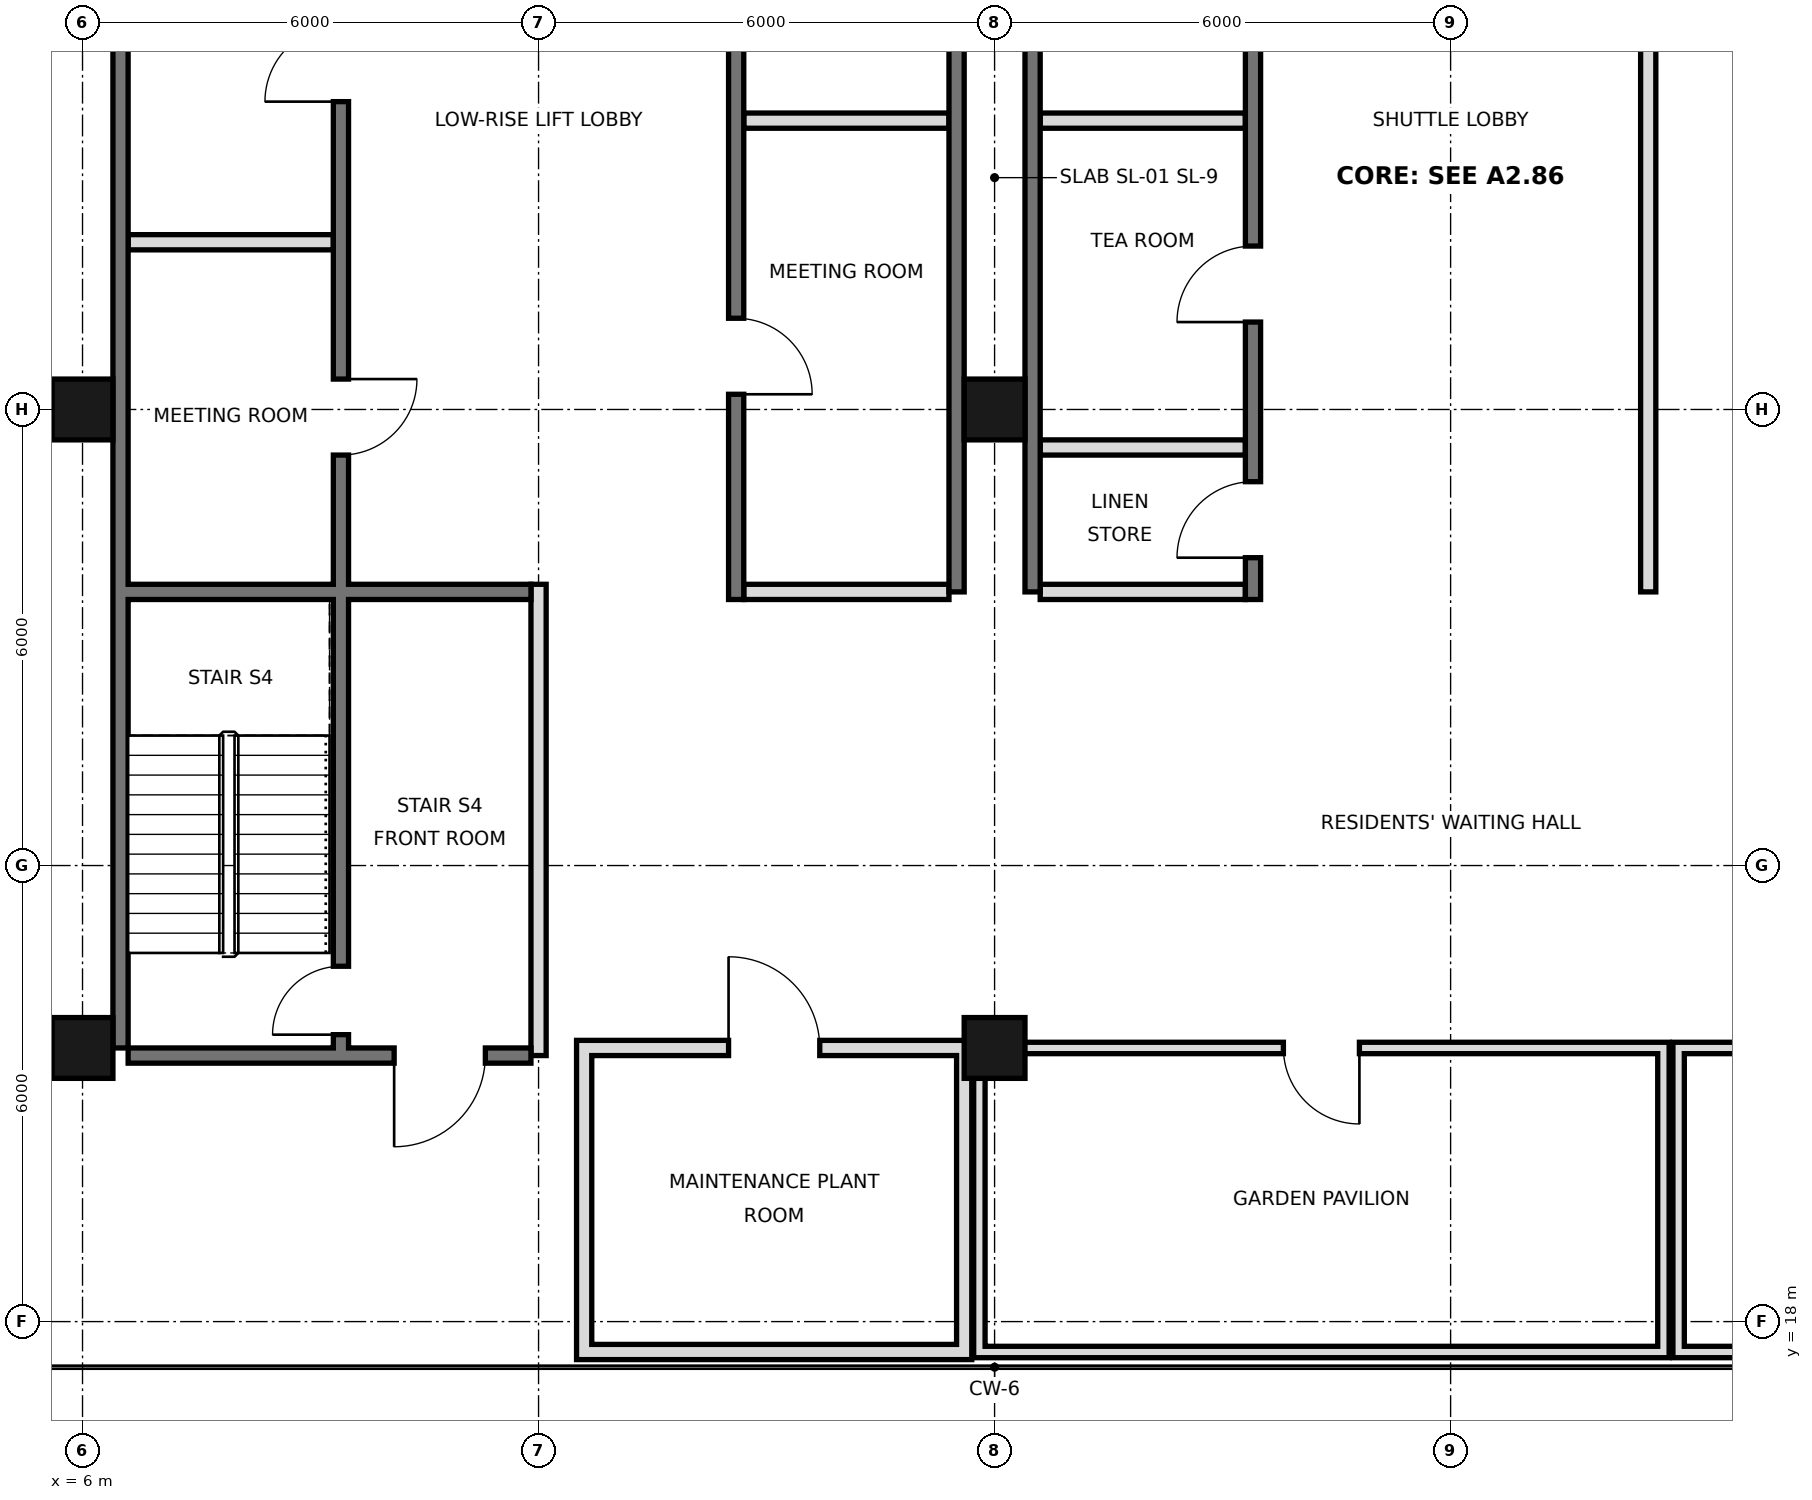
"""IFC4 building model, lengths in metres.
Left out: names, types, materials, properties, quantities, classifications, styles, units other than length and angle.
Written with IfcOpenShell. Run it as: python <this file> out.ifc"""

import sys

from ifc_helpers import new_model, si_unit, direction, frame, frame_2d, origin, origin_2d, place, context, subcontext, project, spatial, rectangle, hollow_rectangle, extrude, element, fill, save


model = new_model("IFC4")
c1 = context("Model", 3, precision=1e-05, world=origin(), true_north=direction((0.0, 1.0)))
c2 = subcontext(c1, "Body", "Model", "MODEL_VIEW")
j1 = project(units=[si_unit("LENGTHUNIT", "METRE"), si_unit("PLANEANGLEUNIT", "RADIAN")], contexts=[c1])
p1 = place(None, origin())
s1 = spatial("IfcSite", under=j1, at=p1, CompositionType="ELEMENT")
p2 = place(p1, origin())
s2 = spatial("IfcBuilding", under=s1, at=p2, CompositionType="ELEMENT")
p3 = place(p2, frame((0.0, 0.0, 345.8)))
s3 = spatial("IfcBuildingStorey", under=s2, at=p3, CompositionType="ELEMENT", Elevation=345.8)
for number, where, z_axis, x_axis in (
    (1, (6.0, 21.6, 0.0), (0.0, 0.0, 1.0), (1.0, 0.0, 0.0)),
    (2, (6.0, 30.0, 0.0), (0.0, 0.0, 1.0), (1.0, 0.0, 0.0)),
    (3, (18.0, 21.6, 0.0), (0.0, 0.0, 1.0), (1.0, 0.0, 0.0)),
    (4, (18.0, 30.0, 0.0), (0.0, 0.0, 1.0), (1.0, 0.0, 0.0)),
):
    element("IfcColumn", number, at=place(p3, frame(where, z_axis=z_axis, x_axis=x_axis)), inside=s3, PredefinedType="COLUMN", context=c2, shape_type="SweptSolid", body=[
        extrude(hollow_rectangle(XDim=0.8, YDim=0.8, WallThickness=0.025, at=origin_2d()), origin(), (0.0, 0.0, 1.0), 4.0),
    ])
for number, where, z_axis, x_axis in (
    (5, (12.6, 17.5, 0.0), (0.0, 0.0, 1.0), (0.0, 1.0, 0.0)),
    (6, (17.6, 17.5, 0.0), (0.0, 0.0, 1.0), (0.0, 1.0, 0.0)),
):
    element("IfcWall", number, at=place(p3, frame(where, z_axis=z_axis, x_axis=x_axis)), inside=s3, PredefinedType="SOLIDWALL", context=c2, shape_type="SweptSolid", body=[
        extrude(rectangle(XDim=4.2, YDim=0.2, at=frame_2d((2.1, 0.0))), origin(), (0.0, 0.0, 1.0), 3.05),
    ])
p4 = place(p3, frame((17.8, 17.525, 0.0), z_axis=(0.0, 0.0, 1.0), x_axis=(0.0, 1.0, 0.0)))
e7 = element("IfcWall", 7, at=p4, inside=s3, PredefinedType="PARTITIONING", context=c2, shape_type="SweptSolid", body=[
    extrude(rectangle(XDim=4.15, YDim=0.15, at=frame_2d((2.075, 0.0))), origin(), (0.0, 0.0, 1.0), 3.15),
])
for number, where, z_axis, x_axis in (
    (8, (26.8, 17.525, 0.0), (0.0, 0.0, 1.0), (0.0, 1.0, 0.0)),
    (9, (27.0, 17.525, 0.0), (0.0, 0.0, 1.0), (0.0, 1.0, 0.0)),
):
    element("IfcWall", number, at=place(p3, frame(where, z_axis=z_axis, x_axis=x_axis)), inside=s3, PredefinedType="PARTITIONING", context=c2, shape_type="SweptSolid", body=[
        extrude(rectangle(XDim=4.15, YDim=0.15, at=frame_2d((2.075, 0.0))), origin(), (0.0, 0.0, 1.0), 3.75),
    ])
p5 = place(p3, frame((12.7, 17.6, 0.0), z_axis=(0.0, 0.0, 1.0), x_axis=(1.0, 0.0, 0.0)))
e10 = element("IfcWall", 10, at=p5, inside=s3, PredefinedType="SOLIDWALL", context=c2, shape_type="SweptSolid", body=[
    extrude(rectangle(XDim=4.8, YDim=0.2, at=frame_2d((2.4, 0.0))), origin(), (0.0, 0.0, 1.0), 3.75),
])
p6 = place(p3, frame((17.875, 17.6, 0.0), z_axis=(0.0, 0.0, 1.0), x_axis=(1.0, 0.0, 0.0)))
e11 = element("IfcWall", 11, at=p6, inside=s3, PredefinedType="PARTITIONING", context=c2, shape_type="SweptSolid", body=[
    extrude(rectangle(XDim=8.85, YDim=0.15, at=frame_2d((4.425, 0.0))), origin(), (0.0, 0.0, 1.0), 3.75),
])
p7 = place(p3, frame((27.075, 17.6, 0.0), z_axis=(0.0, 0.0, 1.0), x_axis=(1.0, 0.0, 0.0)))
e12 = element("IfcWall", 12, at=p7, inside=s3, PredefinedType="PARTITIONING", context=c2, shape_type="SweptSolid", body=[
    extrude(rectangle(XDim=3.85, YDim=0.15, at=frame_2d((1.925, 0.0))), origin(), (0.0, 0.0, 1.0), 3.75),
])
p8 = place(p3, frame((12.7, 21.6, 0.0), z_axis=(0.0, 0.0, 1.0), x_axis=(1.0, 0.0, 0.0)))
e13 = element("IfcWall", 13, at=p8, inside=s3, PredefinedType="SOLIDWALL", context=c2, shape_type="SweptSolid", body=[
    extrude(rectangle(XDim=4.8, YDim=0.2, at=frame_2d((2.4, 0.0))), origin(), (0.0, 0.0, 1.0), 3.75),
])
p9 = place(p8, frame((1.8, 0.0, 0.0)))
e14 = element("IfcOpeningElement", 14, at=p9, cuts=e13, PredefinedType="OPENING", context=c2, shape_type="SweptSolid", body=[
    extrude(rectangle(XDim=1.2, YDim=2.4, at=frame_2d((0.6, 1.2))), frame((0.0, 0.11, 0.0), z_axis=(0.0, -1.0, 0.0), x_axis=(1.0, 0.0, 0.0)), (0.0, 0.0, 1.0), 0.22),
])
p10 = place(p3, frame((17.875, 21.6, 0.0), z_axis=(0.0, 0.0, 1.0), x_axis=(1.0, 0.0, 0.0)))
e15 = element("IfcWall", 15, at=p10, inside=s3, PredefinedType="PARTITIONING", context=c2, shape_type="SweptSolid", body=[
    extrude(rectangle(XDim=8.85, YDim=0.15, at=frame_2d((4.425, 0.0))), origin(), (0.0, 0.0, 1.0), 3.75),
])
p11 = place(p10, frame((3.925, 0.0, 0.0)))
e16 = element("IfcOpeningElement", 16, at=p11, cuts=e15, PredefinedType="OPENING", context=c2, shape_type="SweptSolid", body=[
    extrude(rectangle(XDim=1.0, YDim=2.4, at=frame_2d((0.5, 1.2))), frame((0.0, 0.085, 0.0), z_axis=(0.0, -1.0, 0.0), x_axis=(1.0, 0.0, 0.0)), (0.0, 0.0, 1.0), 0.17),
])
p12 = place(p3, frame((27.075, 21.6, 0.0), z_axis=(0.0, 0.0, 1.0), x_axis=(1.0, 0.0, 0.0)))
e17 = element("IfcWall", 17, at=p12, inside=s3, PredefinedType="PARTITIONING", context=c2, shape_type="SweptSolid", body=[
    extrude(rectangle(XDim=3.85, YDim=0.15, at=frame_2d((1.925, 0.0))), origin(), (0.0, 0.0, 1.0), 3.75),
])
p13 = place(p12, frame((1.425, 0.0, 0.0)))
e18 = element("IfcOpeningElement", 18, at=p13, cuts=e17, PredefinedType="OPENING", context=c2, shape_type="SweptSolid", body=[
    extrude(rectangle(XDim=1.0, YDim=2.4, at=frame_2d((0.5, 1.2))), frame((0.0, 0.085, 0.0), z_axis=(0.0, -1.0, 0.0), x_axis=(1.0, 0.0, 0.0)), (0.0, 0.0, 1.0), 0.17),
])
p14 = place(p3, frame((6.5, 21.6, 0.0), z_axis=(0.0, 0.0, 1.0), x_axis=(0.0, 1.0, 0.0)))
e19 = element("IfcWall", 19, at=p14, inside=s3, PredefinedType="SOLIDWALL", context=c2, shape_type="SweptSolid", body=[
    extrude(rectangle(XDim=23.5, YDim=0.2, at=frame_2d((11.75, 0.0))), origin(), (0.0, 0.0, 1.0), 3.75),
])
for number, where, z_axis, x_axis in (
    (20, (17.5, 27.6, 0.0), (0.0, 0.0, 1.0), (0.0, 1.0, 0.0)),
    (21, (18.5, 27.6, 0.0), (0.0, 0.0, 1.0), (0.0, 1.0, 0.0)),
):
    element("IfcWall", number, at=place(p3, frame(where, z_axis=z_axis, x_axis=x_axis)), inside=s3, PredefinedType="SOLIDWALL", context=c2, shape_type="SweptSolid", body=[
        extrude(rectangle(XDim=17.5, YDim=0.2, at=frame_2d((8.75, 0.0))), origin(), (0.0, 0.0, 1.0), 3.75),
    ])
p15 = place(p3, frame((12.0, 21.5, 0.0), z_axis=(0.0, 0.0, 1.0), x_axis=(0.0, 1.0, 0.0)))
e22 = element("IfcWall", 22, at=p15, inside=s3, PredefinedType="PARTITIONING", context=c2, shape_type="SweptSolid", body=[
    extrude(rectangle(XDim=6.2, YDim=0.2, at=frame_2d((3.1, 0.0))), origin(), (0.0, 0.0, 1.0), 3.75),
])
p16 = place(p3, frame((14.6, 27.5, 0.0), z_axis=(0.0, 0.0, 1.0), x_axis=(0.0, 1.0, 0.0)))
e23 = element("IfcWall", 23, at=p16, inside=s3, PredefinedType="SOLIDWALL", context=c2, shape_type="SweptSolid", body=[
    extrude(rectangle(XDim=17.5, YDim=0.2, at=frame_2d((8.75, 0.0))), origin(), (0.0, 0.0, 1.0), 3.75),
])
p17 = place(p16, frame((15.4, 0.0, 0.0)))
e24 = element("IfcOpeningElement", 24, at=p17, cuts=e23, PredefinedType="OPENING", context=c2, shape_type="SweptSolid", body=[
    extrude(rectangle(XDim=1.1, YDim=2.1, at=frame_2d((0.55, 1.05))), frame((0.0, 0.11, 0.0), z_axis=(0.0, -1.0, 0.0), x_axis=(1.0, 0.0, 0.0)), (0.0, 0.0, 1.0), 0.22),
])
p18 = place(p16, frame((2.7, 0.0, 0.0)))
e25 = element("IfcOpeningElement", 25, at=p18, cuts=e23, PredefinedType="OPENING", context=c2, shape_type="SweptSolid", body=[
    extrude(rectangle(XDim=1.0, YDim=2.1, at=frame_2d((0.5, 1.05))), frame((0.0, 0.11, 0.0), z_axis=(0.0, -1.0, 0.0), x_axis=(1.0, 0.0, 0.0)), (0.0, 0.0, 1.0), 0.22),
])
p19 = place(p3, frame((21.4, 27.5, 0.0), z_axis=(0.0, 0.0, 1.0), x_axis=(0.0, 1.0, 0.0)))
e26 = element("IfcWall", 26, at=p19, inside=s3, PredefinedType="SOLIDWALL", context=c2, shape_type="SweptSolid", body=[
    extrude(rectangle(XDim=17.5, YDim=0.2, at=frame_2d((8.75, 0.0))), origin(), (0.0, 0.0, 1.0), 3.75),
])
p20 = place(p19, frame((0.55, 0.0, 0.0)))
e27 = element("IfcOpeningElement", 27, at=p20, cuts=e26, PredefinedType="OPENING", context=c2, shape_type="SweptSolid", body=[
    extrude(rectangle(XDim=1.0, YDim=2.1, at=frame_2d((0.5, 1.05))), frame((0.0, 0.11, 0.0), z_axis=(0.0, -1.0, 0.0), x_axis=(1.0, 0.0, 0.0)), (0.0, 0.0, 1.0), 0.22),
])
p21 = place(p19, frame((3.65, 0.0, 0.0)))
e28 = element("IfcOpeningElement", 28, at=p21, cuts=e26, PredefinedType="OPENING", context=c2, shape_type="SweptSolid", body=[
    extrude(rectangle(XDim=1.0, YDim=2.1, at=frame_2d((0.5, 1.05))), frame((0.0, 0.11, 0.0), z_axis=(0.0, -1.0, 0.0), x_axis=(1.0, 0.0, 0.0)), (0.0, 0.0, 1.0), 0.22),
])
p22 = place(p19, frame((9.8, 0.0, 0.0)))
e29 = element("IfcOpeningElement", 29, at=p22, cuts=e26, PredefinedType="OPENING", context=c2, shape_type="SweptSolid", body=[
    extrude(rectangle(XDim=1.0, YDim=2.1, at=frame_2d((0.5, 1.05))), frame((0.0, 0.11, 0.0), z_axis=(0.0, -1.0, 0.0), x_axis=(1.0, 0.0, 0.0)), (0.0, 0.0, 1.0), 0.22),
])
p23 = place(p3, frame((26.6, 27.6, 0.0), z_axis=(0.0, 0.0, 1.0), x_axis=(0.0, 1.0, 0.0)))
e30 = element("IfcWall", 30, at=p23, inside=s3, PredefinedType="PARTITIONING", context=c2, shape_type="SweptSolid", body=[
    extrude(rectangle(XDim=17.4, YDim=0.2, at=frame_2d((8.7, 0.0))), origin(), (0.0, 0.0, 1.0), 3.75),
])
p24 = place(p23, frame((10.25, 0.0, 0.0)))
e31 = element("IfcOpeningElement", 31, at=p24, cuts=e30, PredefinedType="OPENING", context=c2, shape_type="SweptSolid", body=[
    extrude(rectangle(XDim=1.0, YDim=2.1, at=frame_2d((0.5, 1.05))), frame((0.0, 0.11, 0.0), z_axis=(0.0, -1.0, 0.0), x_axis=(1.0, 0.0, 0.0)), (0.0, 0.0, 1.0), 0.22),
])
p25 = place(p23, frame((15.375, 0.0, 0.0)))
e32 = element("IfcOpeningElement", 32, at=p25, cuts=e30, PredefinedType="OPENING", context=c2, shape_type="SweptSolid", body=[
    extrude(rectangle(XDim=1.0, YDim=2.1, at=frame_2d((0.5, 1.05))), frame((0.0, 0.11, 0.0), z_axis=(0.0, -1.0, 0.0), x_axis=(1.0, 0.0, 0.0)), (0.0, 0.0, 1.0), 0.22),
])
p26 = place(p3, frame((9.4, 21.5, 0.0), z_axis=(0.0, 0.0, 1.0), x_axis=(0.0, 1.0, 0.0)))
e33 = element("IfcWall", 33, at=p26, inside=s3, PredefinedType="SOLIDWALL", context=c2, shape_type="SweptSolid", body=[
    extrude(rectangle(XDim=23.5, YDim=0.2, at=frame_2d((11.75, 0.0))), origin(), (0.0, 0.0, 1.0), 3.75),
])
p27 = place(p26, frame((7.9, 0.0, 0.0)))
e34 = element("IfcOpeningElement", 34, at=p27, cuts=e33, PredefinedType="OPENING", context=c2, shape_type="SweptSolid", body=[
    extrude(rectangle(XDim=1.0, YDim=2.1, at=frame_2d((0.5, 1.05))), frame((0.0, 0.11, 0.0), z_axis=(0.0, -1.0, 0.0), x_axis=(1.0, 0.0, 0.0)), (0.0, 0.0, 1.0), 0.22),
])
p28 = place(p26, frame((12.55, 0.0, 0.0)))
e35 = element("IfcOpeningElement", 35, at=p28, cuts=e33, PredefinedType="OPENING", context=c2, shape_type="SweptSolid", body=[
    extrude(rectangle(XDim=1.0, YDim=2.1, at=frame_2d((0.5, 1.05))), frame((0.0, 0.11, 0.0), z_axis=(0.0, -1.0, 0.0), x_axis=(1.0, 0.0, 0.0)), (0.0, 0.0, 1.0), 0.22),
])
p29 = place(p26, frame((15.8, 0.0, 0.0)))
e36 = element("IfcOpeningElement", 36, at=p29, cuts=e33, PredefinedType="OPENING", context=c2, shape_type="SweptSolid", body=[
    extrude(rectangle(XDim=1.0, YDim=2.1, at=frame_2d((0.5, 1.05))), frame((0.0, 0.11, 0.0), z_axis=(0.0, -1.0, 0.0), x_axis=(1.0, 0.0, 0.0)), (0.0, 0.0, 1.0), 0.22),
])
p30 = place(p26, frame((0.275, 0.0, 0.0)))
e37 = element("IfcOpeningElement", 37, at=p30, cuts=e33, PredefinedType="OPENING", context=c2, shape_type="SweptSolid", body=[
    extrude(rectangle(XDim=0.9, YDim=2.1, at=frame_2d((0.45, 1.05))), frame((0.0, 0.11, 0.0), z_axis=(0.0, -1.0, 0.0), x_axis=(1.0, 0.0, 0.0)), (0.0, 0.0, 1.0), 0.22),
])
p31 = place(p3, frame((6.6, 21.5, 0.0), z_axis=(0.0, 0.0, 1.0), x_axis=(1.0, 0.0, 0.0)))
e38 = element("IfcWall", 38, at=p31, inside=s3, PredefinedType="SOLIDWALL", context=c2, shape_type="SweptSolid", body=[
    extrude(rectangle(XDim=5.3, YDim=0.2, at=frame_2d((2.65, 0.0))), origin(), (0.0, 0.0, 1.0), 3.75),
])
p32 = place(p31, frame((3.5, 0.0, 0.0)))
e39 = element("IfcOpeningElement", 39, at=p32, cuts=e38, PredefinedType="OPENING", context=c2, shape_type="SweptSolid", body=[
    extrude(rectangle(XDim=1.2, YDim=2.1, at=frame_2d((0.6, 1.05))), frame((0.0, 0.11, 0.0), z_axis=(0.0, -1.0, 0.0), x_axis=(1.0, 0.0, 0.0)), (0.0, 0.0, 1.0), 0.22),
])
for number, where, z_axis, x_axis in (
    (40, (14.7, 27.6, 0.0), (0.0, 0.0, 1.0), (1.0, 0.0, 0.0)),
    (41, (18.6, 27.6, 0.0), (0.0, 0.0, 1.0), (1.0, 0.0, 0.0)),
):
    element("IfcWall", number, at=place(p3, frame(where, z_axis=z_axis, x_axis=x_axis)), inside=s3, PredefinedType="PARTITIONING", context=c2, shape_type="SweptSolid", body=[
        extrude(rectangle(XDim=2.7, YDim=0.2, at=frame_2d((1.35, 0.0))), origin(), (0.0, 0.0, 1.0), 3.75),
    ])
p33 = place(p3, frame((6.6, 27.6, 0.0), z_axis=(0.0, 0.0, 1.0), x_axis=(1.0, 0.0, 0.0)))
e42 = element("IfcWall", 42, at=p33, inside=s3, PredefinedType="SOLIDWALL", context=c2, shape_type="SweptSolid", body=[
    extrude(rectangle(XDim=5.3, YDim=0.2, at=frame_2d((2.65, 0.0))), origin(), (0.0, 0.0, 1.0), 3.75),
])
for number, where, z_axis, x_axis in (
    (43, (18.6, 29.5, 0.0), (0.0, 0.0, 1.0), (1.0, 0.0, 0.0)),
    (44, (6.6, 32.2, 0.0), (0.0, 0.0, 1.0), (1.0, 0.0, 0.0)),
    (45, (14.7, 33.8, 0.0), (0.0, 0.0, 1.0), (1.0, 0.0, 0.0)),
    (46, (18.6, 33.8, 0.0), (0.0, 0.0, 1.0), (1.0, 0.0, 0.0)),
):
    element("IfcWall", number, at=place(p3, frame(where, z_axis=z_axis, x_axis=x_axis)), inside=s3, PredefinedType="PARTITIONING", context=c2, shape_type="SweptSolid", body=[
        extrude(rectangle(XDim=2.7, YDim=0.2, at=frame_2d((1.35, 0.0))), origin(), (0.0, 0.0, 1.0), 3.75),
    ])
p34 = place(p9, origin())
e47 = element("IfcDoor", 47, at=p34, inside=s3, OperationType="SINGLE_SWING_LEFT", PredefinedType="DOOR", context=c2, shape_type="SweptSolid", body=[
    extrude(rectangle(XDim=1.2, YDim=2.4, at=frame_2d((0.6, 1.2))), frame((0.0, 0.025, 0.0), z_axis=(0.0, -1.0, 0.0), x_axis=(1.0, 0.0, 0.0)), (0.0, 0.0, 1.0), 0.05),
])
fill(e14, e47)
p35 = place(p11, origin())
e48 = element("IfcDoor", 48, at=p35, inside=s3, OperationType="SINGLE_SWING_RIGHT", PredefinedType="DOOR", context=c2, shape_type="SweptSolid", body=[
    extrude(rectangle(XDim=1.0, YDim=2.4, at=frame_2d((0.5, 1.2))), frame((0.0, 0.025, 0.0), z_axis=(0.0, -1.0, 0.0), x_axis=(1.0, 0.0, 0.0)), (0.0, 0.0, 1.0), 0.05),
])
fill(e16, e48)
p36 = place(p32, frame((1.2, 0.0, 0.0), z_axis=(0.0, 0.0, 1.0), x_axis=(-1.0, 0.0, 0.0)))
e49 = element("IfcDoor", 49, at=p36, inside=s3, OperationType="SINGLE_SWING_RIGHT", PredefinedType="DOOR", context=c2, shape_type="SweptSolid", body=[
    extrude(rectangle(XDim=1.2, YDim=2.1, at=frame_2d((0.6, 1.05))), frame((0.0, 0.025, 0.0), z_axis=(0.0, -1.0, 0.0), x_axis=(1.0, 0.0, 0.0)), (0.0, 0.0, 1.0), 0.05),
])
fill(e39, e49)
p37 = place(p20, origin())
e50 = element("IfcDoor", 50, at=p37, inside=s3, OperationType="SINGLE_SWING_LEFT", PredefinedType="DOOR", context=c2, shape_type="SweptSolid", body=[
    extrude(rectangle(XDim=1.0, YDim=2.1, at=frame_2d((0.5, 1.05))), frame((0.0, 0.025, 0.0), z_axis=(0.0, -1.0, 0.0), x_axis=(1.0, 0.0, 0.0)), (0.0, 0.0, 1.0), 0.05),
])
fill(e27, e50)
p38 = place(p21, origin())
e51 = element("IfcDoor", 51, at=p38, inside=s3, OperationType="SINGLE_SWING_LEFT", PredefinedType="DOOR", context=c2, shape_type="SweptSolid", body=[
    extrude(rectangle(XDim=1.0, YDim=2.1, at=frame_2d((0.5, 1.05))), frame((0.0, 0.025, 0.0), z_axis=(0.0, -1.0, 0.0), x_axis=(1.0, 0.0, 0.0)), (0.0, 0.0, 1.0), 0.05),
])
fill(e28, e51)
p39 = place(p18, frame((1.0, 0.0, 0.0), z_axis=(0.0, 0.0, 1.0), x_axis=(-1.0, 0.0, 0.0)))
e52 = element("IfcDoor", 52, at=p39, inside=s3, OperationType="SINGLE_SWING_RIGHT", PredefinedType="DOOR", context=c2, shape_type="SweptSolid", body=[
    extrude(rectangle(XDim=1.0, YDim=2.1, at=frame_2d((0.5, 1.05))), frame((0.0, 0.025, 0.0), z_axis=(0.0, -1.0, 0.0), x_axis=(1.0, 0.0, 0.0)), (0.0, 0.0, 1.0), 0.05),
])
fill(e25, e52)
p40 = place(p27, origin())
e53 = element("IfcDoor", 53, at=p40, inside=s3, OperationType="SINGLE_SWING_RIGHT", PredefinedType="DOOR", context=c2, shape_type="SweptSolid", body=[
    extrude(rectangle(XDim=1.0, YDim=2.1, at=frame_2d((0.5, 1.05))), frame((0.0, 0.025, 0.0), z_axis=(0.0, -1.0, 0.0), x_axis=(1.0, 0.0, 0.0)), (0.0, 0.0, 1.0), 0.05),
])
fill(e34, e53)
p41 = place(p28, origin())
e54 = element("IfcDoor", 54, at=p41, inside=s3, OperationType="SINGLE_SWING_LEFT", PredefinedType="DOOR", context=c2, shape_type="SweptSolid", body=[
    extrude(rectangle(XDim=1.0, YDim=2.1, at=frame_2d((0.5, 1.05))), frame((0.0, 0.025, 0.0), z_axis=(0.0, -1.0, 0.0), x_axis=(1.0, 0.0, 0.0)), (0.0, 0.0, 1.0), 0.05),
])
fill(e35, e54)
p42 = place(p30, origin())
e55 = element("IfcDoor", 55, at=p42, inside=s3, OperationType="SINGLE_SWING_LEFT", PredefinedType="DOOR", context=c2, shape_type="SweptSolid", body=[
    extrude(rectangle(XDim=0.9, YDim=2.1, at=frame_2d((0.45, 1.05))), frame((0.0, 0.025, 0.0), z_axis=(0.0, -1.0, 0.0), x_axis=(1.0, 0.0, 0.0)), (0.0, 0.0, 1.0), 0.05),
])
fill(e37, e55)
save(model, sys.argv[1])
